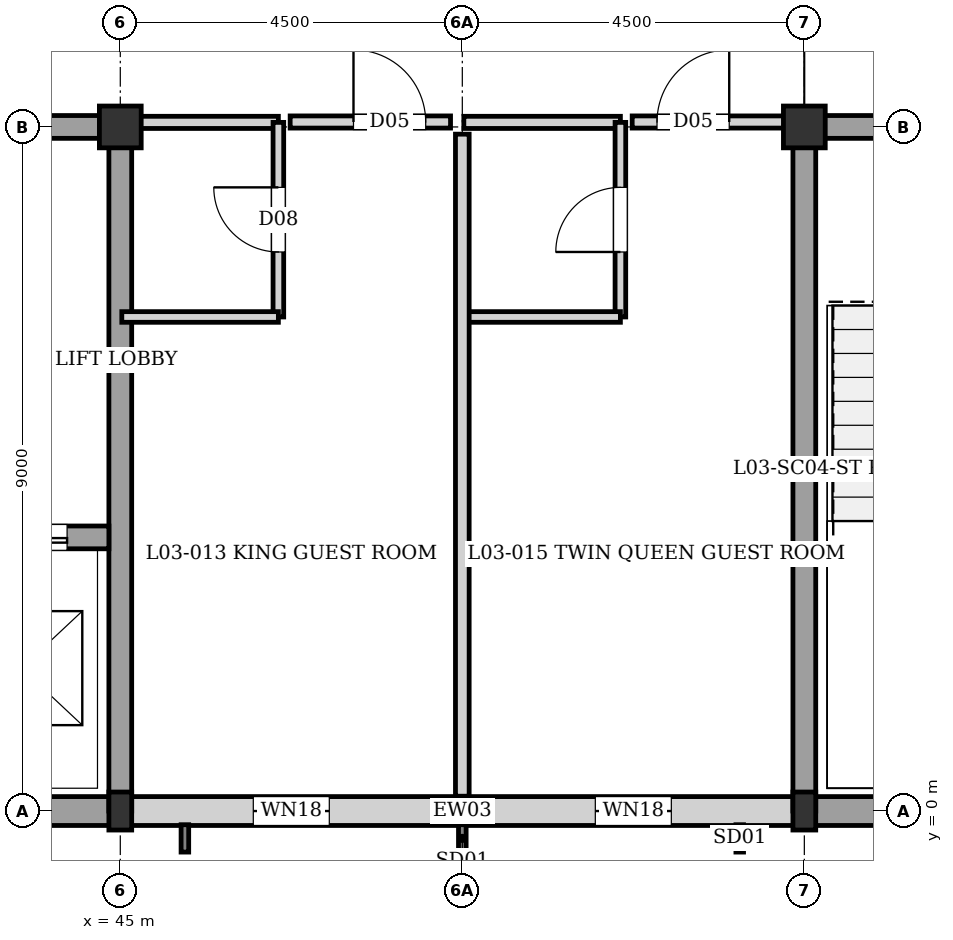
"""IFC4 building model, lengths in metres.
Left out: names, types, materials, properties, quantities, classifications, styles, units other than length and angle.
Written with IfcOpenShell. Run it as: python <this file> out.ifc"""

import sys

from ifc_helpers import new_model, si_unit, direction, frame, frame_2d, origin, origin_2d, place, context, subcontext, project, spatial, rectangle, i_section, extrude, element, fill, save


model = new_model("IFC4")
c1 = context("Model", 3, precision=1e-05, world=origin(), true_north=direction((0.0, 1.0)))
c2 = subcontext(c1, "Body", "Model", "MODEL_VIEW")
j1 = project(units=[si_unit("LENGTHUNIT", "METRE"), si_unit("PLANEANGLEUNIT", "RADIAN")], contexts=[c1])
p1 = place(None, origin())
s1 = spatial("IfcSite", under=j1, at=p1, CompositionType="ELEMENT")
p2 = place(p1, origin())
s2 = spatial("IfcBuilding", under=s1, at=p2, CompositionType="ELEMENT")
p3 = place(p2, frame((0.0, 0.0, 11.52)))
s3 = spatial("IfcBuildingStorey", under=s2, at=p3, CompositionType="ELEMENT", Elevation=11.52)
p4 = place(p3, frame((45.0, 0.0, 0.0), z_axis=(0.0, 0.0, 1.0), x_axis=(1.0, 0.0, 0.0)))
e1 = element("IfcColumn", 1, at=p4, inside=s3, PredefinedType="COLUMN", context=c2, shape_type="SweptSolid", body=[
    extrude(i_section(OverallWidth=0.3, OverallDepth=0.5, WebThickness=0.014, FlangeThickness=0.028, at=origin_2d()), origin(), (0.0, 0.0, 1.0), 3.04),
])
p5 = place(p3, frame((45.0, 9.0, 0.0), z_axis=(0.0, 0.0, 1.0), x_axis=(1.0, 0.0, 0.0)))
e2 = element("IfcColumn", 2, at=p5, inside=s3, PredefinedType="COLUMN", context=c2, shape_type="SweptSolid", body=[
    extrude(rectangle(XDim=0.55, YDim=0.55, at=origin_2d()), origin(), (0.0, 0.0, 1.0), 3.04),
])
p6 = place(p3, frame((54.0, 0.0, 0.0), z_axis=(0.0, 0.0, 1.0), x_axis=(1.0, 0.0, 0.0)))
e3 = element("IfcColumn", 3, at=p6, inside=s3, PredefinedType="COLUMN", context=c2, shape_type="SweptSolid", body=[
    extrude(i_section(OverallWidth=0.3, OverallDepth=0.5, WebThickness=0.014, FlangeThickness=0.028, at=origin_2d()), origin(), (0.0, 0.0, 1.0), 3.04),
])
p7 = place(p3, frame((54.0, 9.0, 0.0), z_axis=(0.0, 0.0, 1.0), x_axis=(1.0, 0.0, 0.0)))
e4 = element("IfcColumn", 4, at=p7, inside=s3, PredefinedType="COLUMN", context=c2, shape_type="SweptSolid", body=[
    extrude(rectangle(XDim=0.55, YDim=0.55, at=origin_2d()), origin(), (0.0, 0.0, 1.0), 3.04),
])
p8 = place(p3, frame((63.0, 0.0, 0.0), z_axis=(0.0, 0.0, 1.0), x_axis=(-1.0, 0.0, 0.0)))
e5 = element("IfcWall", 5, at=p8, inside=s3, PredefinedType="SOLIDWALL", context=c2, shape_type="SweptSolid", body=[
    extrude(rectangle(XDim=9.0, YDim=0.38, at=frame_2d((4.5, 0.0))), origin(), (0.0, 0.0, 1.0), 2.82),
])
p9 = place(p3, frame((53.87, 0.0, 0.0), z_axis=(0.0, 0.0, 1.0), x_axis=(-1.0, 0.0, 0.0)))
e6 = element("IfcWall", 6, at=p9, inside=s3, PredefinedType="SOLIDWALL", context=c2, shape_type="SweptSolid", body=[
    extrude(rectangle(XDim=8.74, YDim=0.38, at=frame_2d((4.37, 0.0))), origin(), (0.0, 0.0, 1.0), 2.42),
])
p10 = place(p9, frame((1.62, 0.0, 0.35)))
e7 = element("IfcOpeningElement", 7, at=p10, cuts=e6, PredefinedType="OPENING", context=c2, shape_type="SweptSolid", body=[
    extrude(rectangle(XDim=1.0, YDim=1.6, at=frame_2d((0.5, 0.8))), frame((0.0, 0.2, 0.0), z_axis=(0.0, -1.0, 0.0), x_axis=(1.0, 0.0, 0.0)), (0.0, 0.0, 1.0), 0.4),
])
p11 = place(p9, frame((6.12, 0.0, 0.35)))
e8 = element("IfcOpeningElement", 8, at=p11, cuts=e6, PredefinedType="OPENING", context=c2, shape_type="SweptSolid", body=[
    extrude(rectangle(XDim=1.0, YDim=1.6, at=frame_2d((0.5, 0.8))), frame((0.0, 0.2, 0.0), z_axis=(0.0, -1.0, 0.0), x_axis=(1.0, 0.0, 0.0)), (0.0, 0.0, 1.0), 0.4),
])
p12 = place(p3, frame((45.0, 0.0, 0.0), z_axis=(0.0, 0.0, 1.0), x_axis=(-1.0, 0.0, 0.0)))
e9 = element("IfcWall", 9, at=p12, inside=s3, PredefinedType="SOLIDWALL", context=c2, shape_type="SweptSolid", body=[
    extrude(rectangle(XDim=9.0, YDim=0.38, at=frame_2d((4.5, 0.0))), origin(), (0.0, 0.0, 1.0), 2.82),
])
p13 = place(p3, frame((45.0, 0.0, 0.0), z_axis=(0.0, 0.0, 1.0), x_axis=(0.0, 1.0, 0.0)))
e10 = element("IfcWall", 10, at=p13, inside=s3, PredefinedType="SHEAR", context=c2, shape_type="SweptSolid", body=[
    extrude(rectangle(XDim=9.0, YDim=0.3, at=frame_2d((4.5, 0.0))), origin(), (0.0, 0.0, 1.0), 2.82),
])
p14 = place(p3, frame((36.0, 9.0, 0.0), z_axis=(0.0, 0.0, 1.0), x_axis=(1.0, 0.0, 0.0)))
e11 = element("IfcWall", 11, at=p14, inside=s3, PredefinedType="SHEAR", context=c2, shape_type="SweptSolid", body=[
    extrude(rectangle(XDim=9.0, YDim=0.3, at=frame_2d((4.5, 0.0))), origin(), (0.0, 0.0, 1.0), 2.82),
])
p15 = place(p14, frame((5.95, 0.0, 0.0)))
e12 = element("IfcOpeningElement", 12, at=p15, cuts=e11, PredefinedType="OPENING", context=c2, shape_type="SweptSolid", body=[
    extrude(rectangle(XDim=1.6, YDim=2.1, at=frame_2d((0.8, 1.05))), frame((0.0, 0.16, 0.0), z_axis=(0.0, -1.0, 0.0), x_axis=(1.0, 0.0, 0.0)), (0.0, 0.0, 1.0), 0.32),
])
p16 = place(p3, frame((40.65, 3.6, 0.0), z_axis=(0.0, 0.0, 1.0), x_axis=(1.0, 0.0, 0.0)))
e13 = element("IfcWall", 13, at=p16, inside=s3, PredefinedType="SHEAR", context=c2, shape_type="SweptSolid", body=[
    extrude(rectangle(XDim=4.2, YDim=0.3, at=frame_2d((2.1, 0.0))), origin(), (0.0, 0.0, 1.0), 2.82),
])
p17 = place(p16, frame((0.55, 0.0, 0.0)))
e14 = element("IfcOpeningElement", 14, at=p17, cuts=e13, PredefinedType="OPENING", context=c2, shape_type="SweptSolid", body=[
    extrude(rectangle(XDim=1.1, YDim=2.1, at=frame_2d((0.55, 1.05))), frame((0.0, 0.16, 0.0), z_axis=(0.0, -1.0, 0.0), x_axis=(1.0, 0.0, 0.0)), (0.0, 0.0, 1.0), 0.32),
])
p18 = place(p16, frame((2.45, 0.0, 0.0)))
e15 = element("IfcOpeningElement", 15, at=p18, cuts=e13, PredefinedType="OPENING", context=c2, shape_type="SweptSolid", body=[
    extrude(rectangle(XDim=1.2, YDim=2.2, at=frame_2d((0.6, 1.1))), frame((0.0, 0.16, 0.0), z_axis=(0.0, -1.0, 0.0), x_axis=(1.0, 0.0, 0.0)), (0.0, 0.0, 1.0), 0.32),
])
p19 = place(p3, frame((54.0, 9.0, 0.0), z_axis=(0.0, 0.0, 1.0), x_axis=(1.0, 0.0, 0.0)))
e16 = element("IfcWall", 16, at=p19, inside=s3, PredefinedType="SHEAR", context=c2, shape_type="SweptSolid", body=[
    extrude(rectangle(XDim=9.0, YDim=0.3, at=frame_2d((4.5, 0.0))), origin(), (0.0, 0.0, 1.0), 2.82),
])
p20 = place(p19, frame((6.05, 0.0, 0.0)))
e17 = element("IfcOpeningElement", 17, at=p20, cuts=e16, PredefinedType="OPENING", context=c2, shape_type="SweptSolid", body=[
    extrude(rectangle(XDim=1.4, YDim=2.02, at=frame_2d((0.7, 1.01))), frame((0.0, 0.16, 0.0), z_axis=(0.0, -1.0, 0.0), x_axis=(1.0, 0.0, 0.0)), (0.0, 0.0, 1.0), 0.32),
])
p21 = place(p3, frame((54.0, 0.0, 0.0), z_axis=(0.0, 0.0, 1.0), x_axis=(0.0, 1.0, 0.0)))
e18 = element("IfcWall", 18, at=p21, inside=s3, PredefinedType="SHEAR", context=c2, shape_type="SweptSolid", body=[
    extrude(rectangle(XDim=9.0, YDim=0.3, at=frame_2d((4.5, 0.0))), origin(), (0.0, 0.0, 1.0), 2.82),
])
p22 = place(p3, frame((45.02, 9.06, 0.0), z_axis=(0.0, 0.0, 1.0), x_axis=(1.0, 0.0, 0.0)))
e19 = element("IfcWall", 19, at=p22, inside=s3, PredefinedType="PARTITIONING", context=c2, shape_type="SweptSolid", body=[
    extrude(rectangle(XDim=2.06, YDim=0.16, at=frame_2d((1.03, 0.0))), origin(), (0.0, 0.0, 1.0), 2.29),
])
p23 = place(p3, frame((47.08, 6.5, 0.0), z_axis=(0.0, 0.0, 1.0), x_axis=(0.0, 1.0, 0.0)))
e20 = element("IfcWall", 20, at=p23, inside=s3, PredefinedType="PLUMBINGWALL", context=c2, shape_type="SweptSolid", body=[
    extrude(rectangle(XDim=2.56, YDim=0.14, at=frame_2d((1.28, 0.0))), origin(), (0.0, 0.0, 1.0), 2.82),
])
p24 = place(p23, frame((0.855, 0.0, 0.0)))
e21 = element("IfcOpeningElement", 21, at=p24, cuts=e20, PredefinedType="OPENING", context=c2, shape_type="SweptSolid", body=[
    extrude(rectangle(XDim=0.85, YDim=2.04, at=frame_2d((0.425, 1.02))), frame((0.0, 0.08, 0.0), z_axis=(0.0, -1.0, 0.0), x_axis=(1.0, 0.0, 0.0)), (0.0, 0.0, 1.0), 0.16),
])
p25 = place(p3, frame((45.02, 6.5, 0.0), z_axis=(0.0, 0.0, 1.0), x_axis=(1.0, 0.0, 0.0)))
e22 = element("IfcWall", 22, at=p25, inside=s3, PredefinedType="PLUMBINGWALL", context=c2, shape_type="SweptSolid", body=[
    extrude(rectangle(XDim=2.06, YDim=0.14, at=frame_2d((1.03, 0.0))), origin(), (0.0, 0.0, 1.0), 2.82),
])
p26 = place(p3, frame((49.52, 9.06, 0.0), z_axis=(0.0, 0.0, 1.0), x_axis=(1.0, 0.0, 0.0)))
e23 = element("IfcWall", 23, at=p26, inside=s3, PredefinedType="PARTITIONING", context=c2, shape_type="SweptSolid", body=[
    extrude(rectangle(XDim=2.06, YDim=0.16, at=frame_2d((1.03, 0.0))), origin(), (0.0, 0.0, 1.0), 2.29),
])
p27 = place(p3, frame((51.58, 6.5, 0.0), z_axis=(0.0, 0.0, 1.0), x_axis=(0.0, 1.0, 0.0)))
e24 = element("IfcWall", 24, at=p27, inside=s3, PredefinedType="PLUMBINGWALL", context=c2, shape_type="SweptSolid", body=[
    extrude(rectangle(XDim=2.56, YDim=0.14, at=frame_2d((1.28, 0.0))), origin(), (0.0, 0.0, 1.0), 2.82),
])
p28 = place(p27, frame((0.855, 0.0, 0.0)))
e25 = element("IfcOpeningElement", 25, at=p28, cuts=e24, PredefinedType="OPENING", context=c2, shape_type="SweptSolid", body=[
    extrude(rectangle(XDim=0.85, YDim=2.04, at=frame_2d((0.425, 1.02))), frame((0.0, 0.08, 0.0), z_axis=(0.0, -1.0, 0.0), x_axis=(1.0, 0.0, 0.0)), (0.0, 0.0, 1.0), 0.16),
])
p29 = place(p3, frame((49.52, 6.5, 0.0), z_axis=(0.0, 0.0, 1.0), x_axis=(1.0, 0.0, 0.0)))
e26 = element("IfcWall", 26, at=p29, inside=s3, PredefinedType="PLUMBINGWALL", context=c2, shape_type="SweptSolid", body=[
    extrude(rectangle(XDim=2.06, YDim=0.14, at=frame_2d((1.03, 0.0))), origin(), (0.0, 0.0, 1.0), 2.82),
])
p30 = place(p3, frame((49.5, 0.195, 0.0), z_axis=(0.0, 0.0, 1.0), x_axis=(0.0, 1.0, 0.0)))
e27 = element("IfcWall", 27, at=p30, inside=s3, PredefinedType="PARTITIONING", context=c2, shape_type="SweptSolid", body=[
    extrude(rectangle(XDim=8.71, YDim=0.18, at=frame_2d((4.355, 0.0))), origin(), (0.0, 0.0, 1.0), 2.82),
])
p31 = place(p3, frame((47.235, 9.065, 0.0), z_axis=(0.0, 0.0, 1.0), x_axis=(1.0, 0.0, 0.0)))
e28 = element("IfcWall", 28, at=p31, inside=s3, PredefinedType="PARTITIONING", context=c2, shape_type="SweptSolid", body=[
    extrude(rectangle(XDim=2.11, YDim=0.16, at=frame_2d((1.055, 0.0))), origin(), (0.0, 0.0, 1.0), 2.29),
])
p32 = place(p31, frame((0.833, 0.0, 0.0)))
e29 = element("IfcOpeningElement", 29, at=p32, cuts=e28, PredefinedType="OPENING", context=c2, shape_type="SweptSolid", body=[
    extrude(rectangle(XDim=0.95, YDim=2.15, at=frame_2d((0.475, 1.075))), frame((0.0, 0.09, 0.0), z_axis=(0.0, -1.0, 0.0), x_axis=(1.0, 0.0, 0.0)), (0.0, 0.0, 1.0), 0.18),
])
p33 = place(p3, frame((51.735, 9.065, 0.0), z_axis=(0.0, 0.0, 1.0), x_axis=(1.0, 0.0, 0.0)))
e30 = element("IfcWall", 30, at=p33, inside=s3, PredefinedType="PARTITIONING", context=c2, shape_type="SweptSolid", body=[
    extrude(rectangle(XDim=2.11, YDim=0.16, at=frame_2d((1.055, 0.0))), origin(), (0.0, 0.0, 1.0), 2.29),
])
p34 = place(p33, frame((0.327, 0.0, 0.0)))
e31 = element("IfcOpeningElement", 31, at=p34, cuts=e30, PredefinedType="OPENING", context=c2, shape_type="SweptSolid", body=[
    extrude(rectangle(XDim=0.95, YDim=2.15, at=frame_2d((0.475, 1.075))), frame((0.0, 0.09, 0.0), z_axis=(0.0, -1.0, 0.0), x_axis=(1.0, 0.0, 0.0)), (0.0, 0.0, 1.0), 0.18),
])
p35 = place(p10, origin())
e32 = element("IfcWindow", 32, at=p35, inside=s3, PartitioningType="SINGLE_PANEL", PredefinedType="WINDOW", context=c2, shape_type="SweptSolid", body=[
    extrude(rectangle(XDim=1.0, YDim=1.6, at=frame_2d((0.5, 0.8))), frame((0.0, 0.03, 0.0), z_axis=(0.0, -1.0, 0.0), x_axis=(1.0, 0.0, 0.0)), (0.0, 0.0, 1.0), 0.06),
])
fill(e7, e32)
p36 = place(p11, origin())
e33 = element("IfcWindow", 33, at=p36, inside=s3, PartitioningType="SINGLE_PANEL", PredefinedType="WINDOW", context=c2, shape_type="SweptSolid", body=[
    extrude(rectangle(XDim=1.0, YDim=1.6, at=frame_2d((0.5, 0.8))), frame((0.0, 0.03, 0.0), z_axis=(0.0, -1.0, 0.0), x_axis=(1.0, 0.0, 0.0)), (0.0, 0.0, 1.0), 0.06),
])
fill(e8, e33)
p37 = place(p18, origin())
e34 = element("IfcDoor", 34, at=p37, inside=s3, OperationType="DOUBLE_DOOR_SLIDING", PredefinedType="DOOR", context=c2, shape_type="SweptSolid", body=[
    extrude(rectangle(XDim=1.2, YDim=2.2, at=frame_2d((0.6, 1.1))), frame((0.0, 0.025, 0.0), z_axis=(0.0, -1.0, 0.0), x_axis=(1.0, 0.0, 0.0)), (0.0, 0.0, 1.0), 0.05),
])
fill(e15, e34)
p38 = place(p24, origin())
e35 = element("IfcDoor", 35, at=p38, inside=s3, OperationType="SINGLE_SWING_RIGHT", PredefinedType="DOOR", context=c2, shape_type="SweptSolid", body=[
    extrude(rectangle(XDim=0.85, YDim=2.04, at=frame_2d((0.425, 1.02))), frame((0.0, 0.025, 0.0), z_axis=(0.0, -1.0, 0.0), x_axis=(1.0, 0.0, 0.0)), (0.0, 0.0, 1.0), 0.05),
])
fill(e21, e35)
p39 = place(p28, origin())
e36 = element("IfcDoor", 36, at=p39, inside=s3, OperationType="SINGLE_SWING_LEFT", PredefinedType="DOOR", context=c2, shape_type="SweptSolid", body=[
    extrude(rectangle(XDim=0.85, YDim=2.04, at=frame_2d((0.425, 1.02))), frame((0.0, 0.025, 0.0), z_axis=(0.0, -1.0, 0.0), x_axis=(1.0, 0.0, 0.0)), (0.0, 0.0, 1.0), 0.05),
])
fill(e25, e36)
p40 = place(p32, origin())
e37 = element("IfcDoor", 37, at=p40, inside=s3, OperationType="SINGLE_SWING_LEFT", PredefinedType="DOOR", context=c2, shape_type="SweptSolid", body=[
    extrude(rectangle(XDim=0.95, YDim=2.15, at=frame_2d((0.475, 1.075))), frame((0.0, 0.025, 0.0), z_axis=(0.0, -1.0, 0.0), x_axis=(1.0, 0.0, 0.0)), (0.0, 0.0, 1.0), 0.05),
])
fill(e29, e37)
p41 = place(p34, origin())
e38 = element("IfcDoor", 38, at=p41, inside=s3, OperationType="SINGLE_SWING_RIGHT", PredefinedType="DOOR", context=c2, shape_type="SweptSolid", body=[
    extrude(rectangle(XDim=0.95, YDim=2.15, at=frame_2d((0.475, 1.075))), frame((0.0, 0.025, 0.0), z_axis=(0.0, -1.0, 0.0), x_axis=(1.0, 0.0, 0.0)), (0.0, 0.0, 1.0), 0.05),
])
fill(e31, e38)
save(model, sys.argv[1])
